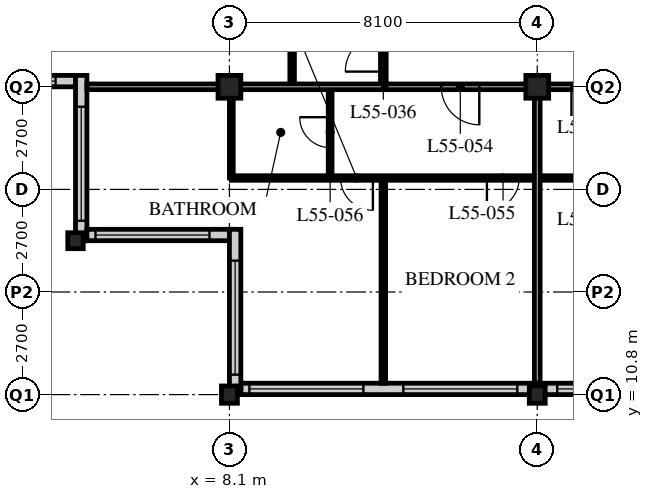
"""IFC4 building model, lengths in metres.
Left out: names, types, materials, properties, quantities, classifications, styles, units other than length and angle.
Written with IfcOpenShell. Run it as: python <this file> out.ifc"""

import sys

from ifc_helpers import new_model, si_unit, direction, frame, frame_2d, origin, origin_2d, place, context, subcontext, project, spatial, rectangle, hollow_rectangle, i_section, extrude, element, fill, save


model = new_model("IFC4")
c1 = context("Model", 3, precision=1e-05, world=origin(), true_north=direction((0.0, 1.0)))
c2 = subcontext(c1, "Body", "Model", "MODEL_VIEW")
j1 = project(units=[si_unit("LENGTHUNIT", "METRE"), si_unit("PLANEANGLEUNIT", "RADIAN")], contexts=[c1])
p1 = place(None, origin())
s1 = spatial("IfcSite", under=j1, at=p1, CompositionType="ELEMENT")
p2 = place(p1, origin())
s2 = spatial("IfcBuilding", under=s1, at=p2, CompositionType="ELEMENT")
p3 = place(p2, frame((0.0, 0.0, 213.6)))
s3 = spatial("IfcBuildingStorey", under=s2, at=p3, CompositionType="ELEMENT", Elevation=213.6)
p4 = place(p3, frame((4.05, 14.85, 0.0), z_axis=(0.0, 0.0, 1.0), x_axis=(1.0, 0.0, 0.0)))
e1 = element("IfcColumn", 1, at=p4, inside=s3, PredefinedType="COLUMN", context=c2, shape_type="SweptSolid", body=[
    extrude(i_section(OverallWidth=0.407, OverallDepth=0.419, WebThickness=0.031, FlangeThickness=0.049, FilletRadius=0.015, at=origin_2d()), origin(), (0.0, 0.0, 1.0), 3.6),
])
p5 = place(p3, frame((8.1, 10.8, 0.0), z_axis=(0.0, 0.0, 1.0), x_axis=(1.0, 0.0, 0.0)))
e2 = element("IfcColumn", 2, at=p5, inside=s3, PredefinedType="COLUMN", context=c2, shape_type="SweptSolid", body=[
    extrude(i_section(OverallWidth=0.418, OverallDepth=0.456, WebThickness=0.042, FlangeThickness=0.067, FilletRadius=0.015, at=origin_2d()), origin(), (0.0, 0.0, 1.0), 3.6),
])
p6 = place(p3, frame((8.1, 18.9, 0.0), z_axis=(0.0, 0.0, 1.0), x_axis=(1.0, 0.0, 0.0)))
e3 = element("IfcColumn", 3, at=p6, inside=s3, PredefinedType="COLUMN", context=c2, shape_type="SweptSolid", body=[
    extrude(hollow_rectangle(XDim=0.6, YDim=0.6, WallThickness=0.05, at=origin_2d()), origin(), (0.0, 0.0, 1.0), 3.6),
])
p7 = place(p3, frame((16.2, 10.8, 0.0), z_axis=(0.0, 0.0, 1.0), x_axis=(1.0, 0.0, 0.0)))
e4 = element("IfcColumn", 4, at=p7, inside=s3, PredefinedType="COLUMN", context=c2, shape_type="SweptSolid", body=[
    extrude(i_section(OverallWidth=0.418, OverallDepth=0.456, WebThickness=0.042, FlangeThickness=0.067, FilletRadius=0.015, at=origin_2d()), origin(), (0.0, 0.0, 1.0), 3.6),
])
p8 = place(p3, frame((16.2, 18.9, 0.0), z_axis=(0.0, 0.0, 1.0), x_axis=(1.0, 0.0, 0.0)))
e5 = element("IfcColumn", 5, at=p8, inside=s3, PredefinedType="COLUMN", context=c2, shape_type="SweptSolid", body=[
    extrude(hollow_rectangle(XDim=0.6, YDim=0.6, WallThickness=0.05, at=origin_2d()), origin(), (0.0, 0.0, 1.0), 3.6),
])
p9 = place(p3, frame((8.4, 10.95, 0.0), z_axis=(0.0, 0.0, 1.0), x_axis=(1.0, 0.0, 0.0)))
e6 = element("IfcWall", 6, at=p9, inside=s3, PredefinedType="SOLIDWALL", context=c2, shape_type="SweptSolid", body=[
    extrude(rectangle(XDim=40.2, YDim=0.3, at=frame_2d((20.1, 0.0))), origin(), (0.0, 0.0, 1.0), 3.39),
])
p10 = place(p9, frame((0.225, 0.0, 0.6)))
e7 = element("IfcOpeningElement", 7, at=p10, cuts=e6, PredefinedType="OPENING", context=c2, shape_type="SweptSolid", body=[
    extrude(rectangle(XDim=3.0, YDim=2.4, at=frame_2d((1.5, 1.2))), frame((0.0, 0.16, 0.0), z_axis=(0.0, -1.0, 0.0), x_axis=(1.0, 0.0, 0.0)), (0.0, 0.0, 1.0), 0.32),
])
p11 = place(p9, frame((4.275, 0.0, 0.6)))
e8 = element("IfcOpeningElement", 8, at=p11, cuts=e6, PredefinedType="OPENING", context=c2, shape_type="SweptSolid", body=[
    extrude(rectangle(XDim=3.0, YDim=2.4, at=frame_2d((1.5, 1.2))), frame((0.0, 0.16, 0.0), z_axis=(0.0, -1.0, 0.0), x_axis=(1.0, 0.0, 0.0)), (0.0, 0.0, 1.0), 0.32),
])
p12 = place(p9, frame((8.325, 0.0, 0.6)))
e9 = element("IfcOpeningElement", 9, at=p12, cuts=e6, PredefinedType="OPENING", context=c2, shape_type="SweptSolid", body=[
    extrude(rectangle(XDim=3.0, YDim=2.4, at=frame_2d((1.5, 1.2))), frame((0.0, 0.16, 0.0), z_axis=(0.0, -1.0, 0.0), x_axis=(1.0, 0.0, 0.0)), (0.0, 0.0, 1.0), 0.32),
])
p13 = place(p9, frame((12.375, 0.0, 0.6)))
e10 = element("IfcOpeningElement", 10, at=p13, cuts=e6, PredefinedType="OPENING", context=c2, shape_type="SweptSolid", body=[
    extrude(rectangle(XDim=3.0, YDim=2.4, at=frame_2d((1.5, 1.2))), frame((0.0, 0.16, 0.0), z_axis=(0.0, -1.0, 0.0), x_axis=(1.0, 0.0, 0.0)), (0.0, 0.0, 1.0), 0.32),
])
p14 = place(p9, frame((16.425, 0.0, 0.6)))
e11 = element("IfcOpeningElement", 11, at=p14, cuts=e6, PredefinedType="OPENING", context=c2, shape_type="SweptSolid", body=[
    extrude(rectangle(XDim=3.0, YDim=2.4, at=frame_2d((1.5, 1.2))), frame((0.0, 0.16, 0.0), z_axis=(0.0, -1.0, 0.0), x_axis=(1.0, 0.0, 0.0)), (0.0, 0.0, 1.0), 0.32),
])
p15 = place(p9, frame((20.475, 0.0, 0.6)))
e12 = element("IfcOpeningElement", 12, at=p15, cuts=e6, PredefinedType="OPENING", context=c2, shape_type="SweptSolid", body=[
    extrude(rectangle(XDim=3.0, YDim=2.4, at=frame_2d((1.5, 1.2))), frame((0.0, 0.16, 0.0), z_axis=(0.0, -1.0, 0.0), x_axis=(1.0, 0.0, 0.0)), (0.0, 0.0, 1.0), 0.32),
])
p16 = place(p9, frame((24.525, 0.0, 0.6)))
e13 = element("IfcOpeningElement", 13, at=p16, cuts=e6, PredefinedType="OPENING", context=c2, shape_type="SweptSolid", body=[
    extrude(rectangle(XDim=3.0, YDim=2.4, at=frame_2d((1.5, 1.2))), frame((0.0, 0.16, 0.0), z_axis=(0.0, -1.0, 0.0), x_axis=(1.0, 0.0, 0.0)), (0.0, 0.0, 1.0), 0.32),
])
p17 = place(p9, frame((28.575, 0.0, 0.6)))
e14 = element("IfcOpeningElement", 14, at=p17, cuts=e6, PredefinedType="OPENING", context=c2, shape_type="SweptSolid", body=[
    extrude(rectangle(XDim=3.0, YDim=2.4, at=frame_2d((1.5, 1.2))), frame((0.0, 0.16, 0.0), z_axis=(0.0, -1.0, 0.0), x_axis=(1.0, 0.0, 0.0)), (0.0, 0.0, 1.0), 0.32),
])
p18 = place(p9, frame((32.625, 0.0, 0.6)))
e15 = element("IfcOpeningElement", 15, at=p18, cuts=e6, PredefinedType="OPENING", context=c2, shape_type="SweptSolid", body=[
    extrude(rectangle(XDim=3.0, YDim=2.4, at=frame_2d((1.5, 1.2))), frame((0.0, 0.16, 0.0), z_axis=(0.0, -1.0, 0.0), x_axis=(1.0, 0.0, 0.0)), (0.0, 0.0, 1.0), 0.32),
])
p19 = place(p9, frame((36.675, 0.0, 0.6)))
e16 = element("IfcOpeningElement", 16, at=p19, cuts=e6, PredefinedType="OPENING", context=c2, shape_type="SweptSolid", body=[
    extrude(rectangle(XDim=3.0, YDim=2.4, at=frame_2d((1.5, 1.2))), frame((0.0, 0.16, 0.0), z_axis=(0.0, -1.0, 0.0), x_axis=(1.0, 0.0, 0.0)), (0.0, 0.0, 1.0), 0.32),
])
p20 = place(p3, frame((0.3, 19.05, 0.0), z_axis=(0.0, 0.0, 1.0), x_axis=(1.0, 0.0, 0.0)))
e17 = element("IfcWall", 17, at=p20, inside=s3, PredefinedType="SOLIDWALL", context=c2, shape_type="SweptSolid", body=[
    extrude(rectangle(XDim=3.75, YDim=0.3, at=frame_2d((1.875, 0.0))), origin(), (0.0, 0.0, 1.0), 3.39),
])
p21 = place(p20, frame((0.225, 0.0, 0.6)))
e18 = element("IfcOpeningElement", 18, at=p21, cuts=e17, PredefinedType="OPENING", context=c2, shape_type="SweptSolid", body=[
    extrude(rectangle(XDim=3.0, YDim=2.0, at=frame_2d((1.5, 1.0))), frame((0.0, 0.16, 0.0), z_axis=(0.0, -1.0, 0.0), x_axis=(1.0, 0.0, 0.0)), (0.0, 0.0, 1.0), 0.32),
])
p22 = place(p3, frame((4.2, 19.2, 0.0), z_axis=(0.0, 0.0, 1.0), x_axis=(0.0, -1.0, 0.0)))
e19 = element("IfcWall", 19, at=p22, inside=s3, PredefinedType="SOLIDWALL", context=c2, shape_type="SweptSolid", body=[
    extrude(rectangle(XDim=4.35, YDim=0.3, at=frame_2d((2.175, 0.0))), origin(), (0.0, 0.0, 1.0), 3.39),
])
p23 = place(p22, frame((0.825, 0.0, 0.6)))
e20 = element("IfcOpeningElement", 20, at=p23, cuts=e19, PredefinedType="OPENING", context=c2, shape_type="SweptSolid", body=[
    extrude(rectangle(XDim=3.0, YDim=2.0, at=frame_2d((1.5, 1.0))), frame((0.0, 0.16, 0.0), z_axis=(0.0, -1.0, 0.0), x_axis=(1.0, 0.0, 0.0)), (0.0, 0.0, 1.0), 0.32),
])
p24 = place(p3, frame((4.35, 15.0, 0.0), z_axis=(0.0, 0.0, 1.0), x_axis=(1.0, 0.0, 0.0)))
e21 = element("IfcWall", 21, at=p24, inside=s3, PredefinedType="SOLIDWALL", context=c2, shape_type="SweptSolid", body=[
    extrude(rectangle(XDim=3.75, YDim=0.3, at=frame_2d((1.875, 0.0))), origin(), (0.0, 0.0, 1.0), 3.39),
])
p25 = place(p24, frame((0.225, 0.0, 0.6)))
e22 = element("IfcOpeningElement", 22, at=p25, cuts=e21, PredefinedType="OPENING", context=c2, shape_type="SweptSolid", body=[
    extrude(rectangle(XDim=3.0, YDim=2.0, at=frame_2d((1.5, 1.0))), frame((0.0, 0.16, 0.0), z_axis=(0.0, -1.0, 0.0), x_axis=(1.0, 0.0, 0.0)), (0.0, 0.0, 1.0), 0.32),
])
p26 = place(p3, frame((8.25, 15.15, 0.0), z_axis=(0.0, 0.0, 1.0), x_axis=(0.0, -1.0, 0.0)))
e23 = element("IfcWall", 23, at=p26, inside=s3, PredefinedType="SOLIDWALL", context=c2, shape_type="SweptSolid", body=[
    extrude(rectangle(XDim=4.35, YDim=0.3, at=frame_2d((2.175, 0.0))), origin(), (0.0, 0.0, 1.0), 3.39),
])
p27 = place(p26, frame((0.825, 0.0, 0.6)))
e24 = element("IfcOpeningElement", 24, at=p27, cuts=e23, PredefinedType="OPENING", context=c2, shape_type="SweptSolid", body=[
    extrude(rectangle(XDim=3.0, YDim=2.0, at=frame_2d((1.5, 1.0))), frame((0.0, 0.16, 0.0), z_axis=(0.0, -1.0, 0.0), x_axis=(1.0, 0.0, 0.0)), (0.0, 0.0, 1.0), 0.32),
])
p28 = place(p3, frame((12.15, 18.9, 0.0), z_axis=(0.0, 0.0, 1.0), x_axis=(1.0, 0.0, 0.0)))
e25 = element("IfcWall", 25, at=p28, inside=s3, PredefinedType="PARTITIONING", context=c2, shape_type="SweptSolid", body=[
    extrude(rectangle(XDim=36.45, YDim=0.15, at=frame_2d((18.225, 0.0))), origin(), (0.0, 0.0, 1.0), 2.778),
])
p29 = place(p28, frame((4.95, 0.0, 0.0)))
e26 = element("IfcOpeningElement", 26, at=p29, cuts=e25, PredefinedType="OPENING", context=c2, shape_type="SweptSolid", body=[
    extrude(rectangle(XDim=1.0, YDim=2.1, at=frame_2d((0.5, 1.05))), frame((0.0, 0.085, 0.0), z_axis=(0.0, -1.0, 0.0), x_axis=(1.0, 0.0, 0.0)), (0.0, 0.0, 1.0), 0.17),
])
p30 = place(p28, frame((22.6, 0.0, 0.0)))
e27 = element("IfcOpeningElement", 27, at=p30, cuts=e25, PredefinedType="OPENING", context=c2, shape_type="SweptSolid", body=[
    extrude(rectangle(XDim=1.0, YDim=2.1, at=frame_2d((0.5, 1.05))), frame((0.0, 0.085, 0.0), z_axis=(0.0, -1.0, 0.0), x_axis=(1.0, 0.0, 0.0)), (0.0, 0.0, 1.0), 0.17),
])
p31 = place(p28, frame((25.0, 0.0, 0.0)))
e28 = element("IfcOpeningElement", 28, at=p31, cuts=e25, PredefinedType="OPENING", context=c2, shape_type="SweptSolid", body=[
    extrude(rectangle(XDim=1.0, YDim=2.1, at=frame_2d((0.5, 1.05))), frame((0.0, 0.085, 0.0), z_axis=(0.0, -1.0, 0.0), x_axis=(1.0, 0.0, 0.0)), (0.0, 0.0, 1.0), 0.17),
])
p32 = place(p28, frame((30.7, 0.0, 0.0)))
e29 = element("IfcOpeningElement", 29, at=p32, cuts=e25, PredefinedType="OPENING", context=c2, shape_type="SweptSolid", body=[
    extrude(rectangle(XDim=1.0, YDim=2.1, at=frame_2d((0.5, 1.05))), frame((0.0, 0.085, 0.0), z_axis=(0.0, -1.0, 0.0), x_axis=(1.0, 0.0, 0.0)), (0.0, 0.0, 1.0), 0.17),
])
p33 = place(p28, frame((1.525, 0.0, 0.0)))
e30 = element("IfcOpeningElement", 30, at=p33, cuts=e25, PredefinedType="OPENING", context=c2, shape_type="SweptSolid", body=[
    extrude(rectangle(XDim=1.0, YDim=2.1, at=frame_2d((0.5, 1.05))), frame((0.0, 0.085, 0.0), z_axis=(0.0, -1.0, 0.0), x_axis=(1.0, 0.0, 0.0)), (0.0, 0.0, 1.0), 0.17),
])
p34 = place(p28, frame((32.825, 0.0, 0.0)))
e31 = element("IfcOpeningElement", 31, at=p34, cuts=e25, PredefinedType="OPENING", context=c2, shape_type="SweptSolid", body=[
    extrude(rectangle(XDim=1.0, YDim=2.1, at=frame_2d((0.5, 1.05))), frame((0.0, 0.085, 0.0), z_axis=(0.0, -1.0, 0.0), x_axis=(1.0, 0.0, 0.0)), (0.0, 0.0, 1.0), 0.17),
])
p35 = place(p3, frame((12.15, 18.9, 0.0), z_axis=(0.0, 0.0, 1.0), x_axis=(0.0, 1.0, 0.0)))
e32 = element("IfcWall", 32, at=p35, inside=s3, PredefinedType="PARTITIONING", context=c2, shape_type="SweptSolid", body=[
    extrude(rectangle(XDim=24.3, YDim=0.15, at=frame_2d((12.15, 0.0))), origin(), (0.0, 0.0, 1.0), 3.39),
])
p36 = place(p35, frame((0.4, 0.0, 0.0)))
e33 = element("IfcOpeningElement", 33, at=p36, cuts=e32, PredefinedType="OPENING", context=c2, shape_type="SweptSolid", body=[
    extrude(rectangle(XDim=1.0, YDim=2.1, at=frame_2d((0.5, 1.05))), frame((0.0, 0.085, 0.0), z_axis=(0.0, -1.0, 0.0), x_axis=(1.0, 0.0, 0.0)), (0.0, 0.0, 1.0), 0.17),
])
p37 = place(p35, frame((16.6, 0.0, 0.0)))
e34 = element("IfcOpeningElement", 34, at=p37, cuts=e32, PredefinedType="OPENING", context=c2, shape_type="SweptSolid", body=[
    extrude(rectangle(XDim=1.0, YDim=2.1, at=frame_2d((0.5, 1.05))), frame((0.0, 0.085, 0.0), z_axis=(0.0, -1.0, 0.0), x_axis=(1.0, 0.0, 0.0)), (0.0, 0.0, 1.0), 0.17),
])
p38 = place(p3, frame((9.75, 18.9, 0.0), z_axis=(0.0, 0.0, 1.0), x_axis=(0.0, 1.0, 0.0)))
e35 = element("IfcWall", 35, at=p38, inside=s3, PredefinedType="PARTITIONING", context=c2, shape_type="SweptSolid", body=[
    extrude(rectangle(XDim=24.3, YDim=0.12, at=frame_2d((12.15, 0.0))), origin(), (0.0, 0.0, 1.0), 3.39),
])
p39 = place(p38, frame((0.975, 0.0, 0.0)))
e36 = element("IfcOpeningElement", 36, at=p39, cuts=e35, PredefinedType="OPENING", context=c2, shape_type="SweptSolid", body=[
    extrude(rectangle(XDim=0.85, YDim=2.1, at=frame_2d((0.425, 1.05))), frame((0.0, 0.07, 0.0), z_axis=(0.0, -1.0, 0.0), x_axis=(1.0, 0.0, 0.0)), (0.0, 0.0, 1.0), 0.14),
])
p40 = place(p38, frame((8.425, 0.0, 0.0)))
e37 = element("IfcOpeningElement", 37, at=p40, cuts=e35, PredefinedType="OPENING", context=c2, shape_type="SweptSolid", body=[
    extrude(rectangle(XDim=0.85, YDim=2.1, at=frame_2d((0.425, 1.05))), frame((0.0, 0.07, 0.0), z_axis=(0.0, -1.0, 0.0), x_axis=(1.0, 0.0, 0.0)), (0.0, 0.0, 1.0), 0.14),
])
p41 = place(p38, frame((12.475, 0.0, 0.0)))
e38 = element("IfcOpeningElement", 38, at=p41, cuts=e35, PredefinedType="OPENING", context=c2, shape_type="SweptSolid", body=[
    extrude(rectangle(XDim=0.85, YDim=2.1, at=frame_2d((0.425, 1.05))), frame((0.0, 0.07, 0.0), z_axis=(0.0, -1.0, 0.0), x_axis=(1.0, 0.0, 0.0)), (0.0, 0.0, 1.0), 0.14),
])
p42 = place(p38, frame((17.175, 0.0, 0.0)))
e39 = element("IfcOpeningElement", 39, at=p42, cuts=e35, PredefinedType="OPENING", context=c2, shape_type="SweptSolid", body=[
    extrude(rectangle(XDim=0.85, YDim=2.1, at=frame_2d((0.425, 1.05))), frame((0.0, 0.07, 0.0), z_axis=(0.0, -1.0, 0.0), x_axis=(1.0, 0.0, 0.0)), (0.0, 0.0, 1.0), 0.14),
])
p43 = place(p38, frame((20.575, 0.0, 0.0)))
e40 = element("IfcOpeningElement", 40, at=p43, cuts=e35, PredefinedType="OPENING", context=c2, shape_type="SweptSolid", body=[
    extrude(rectangle(XDim=0.85, YDim=2.1, at=frame_2d((0.425, 1.05))), frame((0.0, 0.07, 0.0), z_axis=(0.0, -1.0, 0.0), x_axis=(1.0, 0.0, 0.0)), (0.0, 0.0, 1.0), 0.14),
])
p44 = place(p3, frame((10.75, 18.9, 0.0), z_axis=(0.0, 0.0, 1.0), x_axis=(0.0, -1.0, 0.0)))
e41 = element("IfcWall", 41, at=p44, inside=s3, PredefinedType="PARTITIONING", context=c2, shape_type="SweptSolid", body=[
    extrude(rectangle(XDim=2.4, YDim=0.1, at=frame_2d((1.2, 0.0))), origin(), (0.0, 0.0, 1.0), 3.39),
])
p45 = place(p44, frame((0.8, 0.0, 0.0)))
e42 = element("IfcOpeningElement", 42, at=p45, cuts=e41, PredefinedType="OPENING", context=c2, shape_type="SweptSolid", body=[
    extrude(rectangle(XDim=0.8, YDim=2.1, at=frame_2d((0.4, 1.05))), frame((0.0, 0.06, 0.0), z_axis=(0.0, -1.0, 0.0), x_axis=(1.0, 0.0, 0.0)), (0.0, 0.0, 1.0), 0.12),
])
p46 = place(p3, frame((8.15, 18.9, 0.0), z_axis=(0.0, 0.0, 1.0), x_axis=(0.0, -1.0, 0.0)))
e43 = element("IfcWall", 43, at=p46, inside=s3, PredefinedType="PARTITIONING", context=c2, shape_type="SweptSolid", body=[
    extrude(rectangle(XDim=2.4, YDim=0.1, at=frame_2d((1.2, 0.0))), origin(), (0.0, 0.0, 1.0), 2.778),
])
p47 = place(p3, frame((8.15, 16.5, 0.0), z_axis=(0.0, 0.0, 1.0), x_axis=(1.0, 0.0, 0.0)))
e44 = element("IfcWall", 44, at=p47, inside=s3, PredefinedType="PARTITIONING", context=c2, shape_type="SweptSolid", body=[
    extrude(rectangle(XDim=24.25, YDim=0.12, at=frame_2d((12.125, 0.0))), origin(), (0.0, 0.0, 1.0), 3.39),
])
p48 = place(p47, frame((9.025, 0.0, 0.0)))
e45 = element("IfcOpeningElement", 45, at=p48, cuts=e44, PredefinedType="OPENING", context=c2, shape_type="SweptSolid", body=[
    extrude(rectangle(XDim=0.85, YDim=2.1, at=frame_2d((0.425, 1.05))), frame((0.0, 0.07, 0.0), z_axis=(0.0, -1.0, 0.0), x_axis=(1.0, 0.0, 0.0)), (0.0, 0.0, 1.0), 0.14),
])
p49 = place(p47, frame((16.475, 0.0, 0.0)))
e46 = element("IfcOpeningElement", 46, at=p49, cuts=e44, PredefinedType="OPENING", context=c2, shape_type="SweptSolid", body=[
    extrude(rectangle(XDim=0.85, YDim=2.1, at=frame_2d((0.425, 1.05))), frame((0.0, 0.07, 0.0), z_axis=(0.0, -1.0, 0.0), x_axis=(1.0, 0.0, 0.0)), (0.0, 0.0, 1.0), 0.14),
])
p50 = place(p47, frame((20.525, 0.0, 0.0)))
e47 = element("IfcOpeningElement", 47, at=p50, cuts=e44, PredefinedType="OPENING", context=c2, shape_type="SweptSolid", body=[
    extrude(rectangle(XDim=0.85, YDim=2.1, at=frame_2d((0.425, 1.05))), frame((0.0, 0.07, 0.0), z_axis=(0.0, -1.0, 0.0), x_axis=(1.0, 0.0, 0.0)), (0.0, 0.0, 1.0), 0.14),
])
p51 = place(p47, frame((6.725, 0.0, 0.0)))
e48 = element("IfcOpeningElement", 48, at=p51, cuts=e44, PredefinedType="OPENING", context=c2, shape_type="SweptSolid", body=[
    extrude(rectangle(XDim=0.85, YDim=2.1, at=frame_2d((0.425, 1.05))), frame((0.0, 0.07, 0.0), z_axis=(0.0, -1.0, 0.0), x_axis=(1.0, 0.0, 0.0)), (0.0, 0.0, 1.0), 0.14),
])
p52 = place(p47, frame((2.875, 0.0, 0.0)))
e49 = element("IfcOpeningElement", 49, at=p52, cuts=e44, PredefinedType="OPENING", context=c2, shape_type="SweptSolid", body=[
    extrude(rectangle(XDim=0.85, YDim=2.1, at=frame_2d((0.425, 1.05))), frame((0.0, 0.07, 0.0), z_axis=(0.0, -1.0, 0.0), x_axis=(1.0, 0.0, 0.0)), (0.0, 0.0, 1.0), 0.14),
])
p53 = place(p3, frame((12.15, 16.5, 0.0), z_axis=(0.0, 0.0, 1.0), x_axis=(0.0, -1.0, 0.0)))
e50 = element("IfcWall", 50, at=p53, inside=s3, PredefinedType="PARTITIONING", context=c2, shape_type="SweptSolid", body=[
    extrude(rectangle(XDim=5.4, YDim=0.12, at=frame_2d((2.7, 0.0))), origin(), (0.0, 0.0, 1.0), 3.39),
])
for number, where, z_axis, x_axis in (
    (51, (4.35, 18.9, 0.0), (0.0, 0.0, 1.0), (1.0, 0.0, 0.0)),
    (52, (16.2, 18.9, 0.0), (0.0, 0.0, 1.0), (0.0, -1.0, 0.0)),
):
    element("IfcWall", number, at=place(p3, frame(where, z_axis=z_axis, x_axis=x_axis)), inside=s3, PredefinedType="PARTITIONING", context=c2, shape_type="SweptSolid", body=[
        extrude(rectangle(XDim=7.8, YDim=0.15, at=frame_2d((3.9, 0.0))), origin(), (0.0, 0.0, 1.0), 2.778),
    ])
p54 = place(p10, origin())
e53 = element("IfcWindow", 53, at=p54, inside=s3, PartitioningType="SINGLE_PANEL", PredefinedType="WINDOW", context=c2, shape_type="SweptSolid", body=[
    extrude(rectangle(XDim=3.0, YDim=2.4, at=frame_2d((1.5, 1.2))), frame((0.0, 0.03, 0.0), z_axis=(0.0, -1.0, 0.0), x_axis=(1.0, 0.0, 0.0)), (0.0, 0.0, 1.0), 0.06),
])
fill(e7, e53)
p55 = place(p11, origin())
e54 = element("IfcWindow", 54, at=p55, inside=s3, PartitioningType="SINGLE_PANEL", PredefinedType="WINDOW", context=c2, shape_type="SweptSolid", body=[
    extrude(rectangle(XDim=3.0, YDim=2.4, at=frame_2d((1.5, 1.2))), frame((0.0, 0.03, 0.0), z_axis=(0.0, -1.0, 0.0), x_axis=(1.0, 0.0, 0.0)), (0.0, 0.0, 1.0), 0.06),
])
fill(e8, e54)
p56 = place(p12, origin())
e55 = element("IfcWindow", 55, at=p56, inside=s3, PartitioningType="SINGLE_PANEL", PredefinedType="WINDOW", context=c2, shape_type="SweptSolid", body=[
    extrude(rectangle(XDim=3.0, YDim=2.4, at=frame_2d((1.5, 1.2))), frame((0.0, 0.03, 0.0), z_axis=(0.0, -1.0, 0.0), x_axis=(1.0, 0.0, 0.0)), (0.0, 0.0, 1.0), 0.06),
])
fill(e9, e55)
p57 = place(p21, origin())
e56 = element("IfcWindow", 56, at=p57, inside=s3, PartitioningType="SINGLE_PANEL", PredefinedType="WINDOW", context=c2, shape_type="SweptSolid", body=[
    extrude(rectangle(XDim=3.0, YDim=2.0, at=frame_2d((1.5, 1.0))), frame((0.0, 0.03, 0.0), z_axis=(0.0, -1.0, 0.0), x_axis=(1.0, 0.0, 0.0)), (0.0, 0.0, 1.0), 0.06),
])
fill(e18, e56)
p58 = place(p23, origin())
e57 = element("IfcWindow", 57, at=p58, inside=s3, PartitioningType="SINGLE_PANEL", PredefinedType="WINDOW", context=c2, shape_type="SweptSolid", body=[
    extrude(rectangle(XDim=3.0, YDim=2.0, at=frame_2d((1.5, 1.0))), frame((0.0, 0.03, 0.0), z_axis=(0.0, -1.0, 0.0), x_axis=(1.0, 0.0, 0.0)), (0.0, 0.0, 1.0), 0.06),
])
fill(e20, e57)
p59 = place(p25, origin())
e58 = element("IfcWindow", 58, at=p59, inside=s3, PartitioningType="SINGLE_PANEL", PredefinedType="WINDOW", context=c2, shape_type="SweptSolid", body=[
    extrude(rectangle(XDim=3.0, YDim=2.0, at=frame_2d((1.5, 1.0))), frame((0.0, 0.03, 0.0), z_axis=(0.0, -1.0, 0.0), x_axis=(1.0, 0.0, 0.0)), (0.0, 0.0, 1.0), 0.06),
])
fill(e22, e58)
p60 = place(p27, origin())
e59 = element("IfcWindow", 59, at=p60, inside=s3, PartitioningType="SINGLE_PANEL", PredefinedType="WINDOW", context=c2, shape_type="SweptSolid", body=[
    extrude(rectangle(XDim=3.0, YDim=2.0, at=frame_2d((1.5, 1.0))), frame((0.0, 0.03, 0.0), z_axis=(0.0, -1.0, 0.0), x_axis=(1.0, 0.0, 0.0)), (0.0, 0.0, 1.0), 0.06),
])
fill(e24, e59)
p61 = place(p29, origin())
e60 = element("IfcDoor", 60, at=p61, inside=s3, OperationType="SINGLE_SWING_RIGHT", PredefinedType="DOOR", context=c2, shape_type="SweptSolid", body=[
    extrude(rectangle(XDim=1.0, YDim=2.1, at=frame_2d((0.5, 1.05))), frame((0.0, 0.025, 0.0), z_axis=(0.0, -1.0, 0.0), x_axis=(1.0, 0.0, 0.0)), (0.0, 0.0, 1.0), 0.05),
])
fill(e26, e60)
p62 = place(p36, origin())
e61 = element("IfcDoor", 61, at=p62, inside=s3, OperationType="SINGLE_SWING_LEFT", PredefinedType="DOOR", context=c2, shape_type="SweptSolid", body=[
    extrude(rectangle(XDim=1.0, YDim=2.1, at=frame_2d((0.5, 1.05))), frame((0.0, 0.025, 0.0), z_axis=(0.0, -1.0, 0.0), x_axis=(1.0, 0.0, 0.0)), (0.0, 0.0, 1.0), 0.05),
])
fill(e33, e61)
p63 = place(p33, origin())
e62 = element("IfcDoor", 62, at=p63, inside=s3, OperationType="SINGLE_SWING_LEFT", PredefinedType="DOOR", context=c2, shape_type="SweptSolid", body=[
    extrude(rectangle(XDim=1.0, YDim=2.1, at=frame_2d((0.5, 1.05))), frame((0.0, 0.025, 0.0), z_axis=(0.0, -1.0, 0.0), x_axis=(1.0, 0.0, 0.0)), (0.0, 0.0, 1.0), 0.05),
])
fill(e30, e62)
p64 = place(p51, origin())
e63 = element("IfcDoor", 63, at=p64, inside=s3, OperationType="SINGLE_SWING_RIGHT", PredefinedType="DOOR", context=c2, shape_type="SweptSolid", body=[
    extrude(rectangle(XDim=0.85, YDim=2.1, at=frame_2d((0.425, 1.05))), frame((0.0, 0.025, 0.0), z_axis=(0.0, -1.0, 0.0), x_axis=(1.0, 0.0, 0.0)), (0.0, 0.0, 1.0), 0.05),
])
fill(e48, e63)
p65 = place(p45, origin())
e64 = element("IfcDoor", 64, at=p65, inside=s3, OperationType="SINGLE_SWING_RIGHT", PredefinedType="DOOR", context=c2, shape_type="SweptSolid", body=[
    extrude(rectangle(XDim=0.8, YDim=2.1, at=frame_2d((0.4, 1.05))), frame((0.0, 0.025, 0.0), z_axis=(0.0, -1.0, 0.0), x_axis=(1.0, 0.0, 0.0)), (0.0, 0.0, 1.0), 0.05),
])
fill(e42, e64)
p66 = place(p52, origin())
e65 = element("IfcDoor", 65, at=p66, inside=s3, OperationType="SINGLE_SWING_LEFT", PredefinedType="DOOR", context=c2, shape_type="SweptSolid", body=[
    extrude(rectangle(XDim=0.85, YDim=2.1, at=frame_2d((0.425, 1.05))), frame((0.0, 0.025, 0.0), z_axis=(0.0, -1.0, 0.0), x_axis=(1.0, 0.0, 0.0)), (0.0, 0.0, 1.0), 0.05),
])
fill(e49, e65)
save(model, sys.argv[1])
